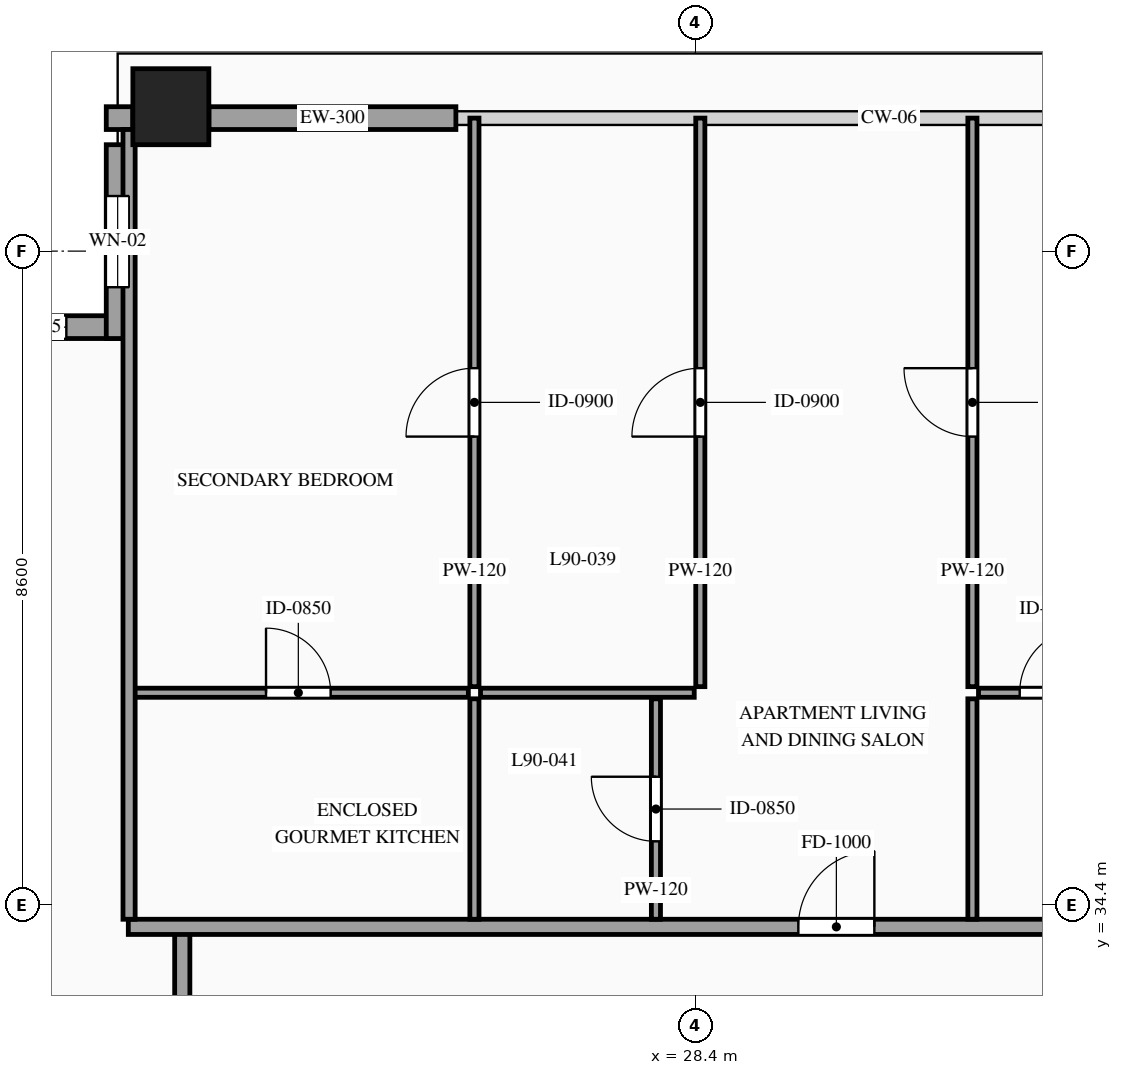
"""IFC4 building model, lengths in metres.
Left out: names, types, materials, properties, quantities, classifications, styles, units other than length and angle.
Written with IfcOpenShell. Run it as: python <this file> out.ifc"""

import sys

from ifc_helpers import new_model, si_unit, direction, frame, frame_2d, origin, origin_2d, place, context, subcontext, project, spatial, rectangle, hollow_rectangle, extrude, source, transform, mapped, element, fill, save


model = new_model("IFC4")
c1 = context("Model", 3, precision=1e-05, world=origin(), true_north=direction((0.0, 1.0)))
c2 = subcontext(c1, "Body", "Model", "MODEL_VIEW")
j1 = project(units=[si_unit("LENGTHUNIT", "METRE"), si_unit("PLANEANGLEUNIT", "RADIAN")], contexts=[c1])
p1 = place(None, origin())
s1 = spatial("IfcSite", under=j1, at=p1, CompositionType="ELEMENT")
p2 = place(p1, origin())
s2 = spatial("IfcBuilding", under=s1, at=p2, CompositionType="ELEMENT")
p3 = place(p2, frame((0.0, 0.0, 335.7)))
s3 = spatial("IfcBuildingStorey", under=s2, at=p3, CompositionType="ELEMENT", Elevation=335.7)
m1 = source(origin(), c2, "Body", "SweptSolid", [
    extrude(hollow_rectangle(XDim=1.0, YDim=1.0, WallThickness=0.048, at=origin_2d()), origin(), (0.0, 0.0, 1.0), 3.5),
])
p4 = place(p3, frame((21.5, 44.9, 0.0), z_axis=(0.0, 0.0, 1.0), x_axis=(1.0, 0.0, 0.0)))
e1 = element("IfcColumn", 1, at=p4, inside=s3, PredefinedType="COLUMN", context=c2, shape_type="MappedRepresentation", body=[
    mapped(m1, transform((0.0, 0.0, 0.0), scale=1.0)),
])
p5 = place(p3, frame((20.95, 42.0, 0.0), z_axis=(0.0, 0.0, 1.0), x_axis=(-1.0, 0.0, 0.0)))
e2 = element("IfcWall", 2, at=p5, inside=s3, PredefinedType="SOLIDWALL", context=c2, shape_type="SweptSolid", body=[
    extrude(rectangle(XDim=2.55, YDim=0.3, at=frame_2d((1.275, 0.0))), origin(), (0.0, 0.0, 1.0), 3.26),
])
p6 = place(p5, frame((0.825, 0.0, 0.85)))
e3 = element("IfcOpeningElement", 3, at=p6, cuts=e2, PredefinedType="OPENING", context=c2, shape_type="SweptSolid", body=[
    extrude(rectangle(XDim=0.9, YDim=1.5, at=frame_2d((0.45, 0.75))), frame((0.0, 0.165, 0.0), z_axis=(0.0, -1.0, 0.0), x_axis=(1.0, 0.0, 0.0)), (0.0, 0.0, 1.0), 0.33),
])
p7 = place(p3, frame((20.8, 44.4, 0.0), z_axis=(0.0, 0.0, 1.0), x_axis=(0.0, -1.0, 0.0)))
e4 = element("IfcWall", 4, at=p7, inside=s3, PredefinedType="SOLIDWALL", context=c2, shape_type="SweptSolid", body=[
    extrude(rectangle(XDim=2.55, YDim=0.3, at=frame_2d((1.275, 0.0))), origin(), (0.0, 0.0, 1.0), 3.26),
])
p8 = place(p7, frame((0.675, 0.0, 0.85)))
e5 = element("IfcOpeningElement", 5, at=p8, cuts=e4, PredefinedType="OPENING", context=c2, shape_type="SweptSolid", body=[
    extrude(rectangle(XDim=1.2, YDim=2.1, at=frame_2d((0.6, 1.05))), frame((0.0, 0.165, 0.0), z_axis=(0.0, -1.0, 0.0), x_axis=(1.0, 0.0, 0.0)), (0.0, 0.0, 1.0), 0.33),
])
m2 = source(origin(), c2, "Body", "SweptSolid", [
    extrude(rectangle(XDim=0.35, YDim=0.3, at=frame_2d((0.175, 0.0))), origin(), (0.0, 0.0, 1.0), 3.26),
])
p9 = place(p3, frame((20.65, 44.75, 0.0), z_axis=(0.0, 0.0, 1.0), x_axis=(1.0, 0.0, 0.0)))
e6 = element("IfcWall", 6, at=p9, inside=s3, PredefinedType="SOLIDWALL", context=c2, shape_type="MappedRepresentation", body=[
    mapped(m2, transform((0.0, 0.0, 0.0), scale=1.0)),
])
m3 = source(origin(), c2, "Body", "SweptSolid", [
    extrude(rectangle(XDim=3.25, YDim=0.3, at=frame_2d((1.625, 0.0))), origin(), (0.0, 0.0, 1.0), 2.865),
])
p10 = place(p3, frame((22.0, 44.75, 0.0), z_axis=(0.0, 0.0, 1.0), x_axis=(1.0, 0.0, 0.0)))
e7 = element("IfcWall", 7, at=p10, inside=s3, PredefinedType="SOLIDWALL", context=c2, shape_type="MappedRepresentation", body=[
    mapped(m3, transform((0.0, 0.0, 0.0), scale=1.0)),
])
m4 = source(origin(), c2, "Body", "SweptSolid", [
    extrude(rectangle(XDim=1.7, YDim=0.2, at=frame_2d((0.85, 0.0))), origin(), (0.0, 0.0, 1.0), 3.26),
])
p11 = place(p3, frame((21.65, 32.35, 0.0), z_axis=(0.0, 0.0, 1.0), x_axis=(0.0, 1.0, 0.0)))
e8 = element("IfcWall", 8, at=p11, inside=s3, PredefinedType="PARTITIONING", context=c2, shape_type="MappedRepresentation", body=[
    mapped(m4, transform((0.0, 0.0, 0.0), scale=1.0)),
])
p12 = place(p3, frame((20.94, 34.11, 0.0), z_axis=(0.0, 0.0, 1.0), x_axis=(1.0, 0.0, 0.0)))
e9 = element("IfcWall", 9, at=p12, inside=s3, PredefinedType="PARTITIONING", context=c2, shape_type="SweptSolid", body=[
    extrude(rectangle(XDim=15.98, YDim=0.2, at=frame_2d((7.99, 0.0))), origin(), (0.0, 0.0, 1.0), 3.26),
])
p13 = place(p12, frame((8.816, 0.0, 0.0)))
e10 = element("IfcOpeningElement", 10, at=p13, cuts=e9, PredefinedType="OPENING", context=c2, shape_type="SweptSolid", body=[
    extrude(rectangle(XDim=1.0, YDim=2.2, at=frame_2d((0.5, 1.1))), frame((0.0, 0.115, 0.0), z_axis=(0.0, -1.0, 0.0), x_axis=(1.0, 0.0, 0.0)), (0.0, 0.0, 1.0), 0.23),
])
p14 = place(p3, frame((20.94, 37.19, 0.0), z_axis=(0.0, 0.0, 1.0), x_axis=(1.0, 0.0, 0.0)))
e11 = element("IfcWall", 11, at=p14, inside=s3, PredefinedType="PARTITIONING", context=c2, shape_type="SweptSolid", body=[
    extrude(rectangle(XDim=4.474, YDim=0.12, at=frame_2d((2.237, 0.0))), origin(), (0.0, 0.0, 1.0), 3.26),
])
p15 = place(p14, frame((1.812, 0.0, 0.0)))
e12 = element("IfcOpeningElement", 12, at=p15, cuts=e11, PredefinedType="OPENING", context=c2, shape_type="SweptSolid", body=[
    extrude(rectangle(XDim=0.85, YDim=2.1, at=frame_2d((0.425, 1.05))), frame((0.0, 0.075, 0.0), z_axis=(0.0, -1.0, 0.0), x_axis=(1.0, 0.0, 0.0)), (0.0, 0.0, 1.0), 0.15),
])
m5 = source(origin(), c2, "Body", "SweptSolid", [
    extrude(rectangle(XDim=2.9, YDim=0.12, at=frame_2d((1.45, 0.0))), origin(), (0.0, 0.0, 1.0), 3.26),
])
p16 = place(p3, frame((25.494, 34.21, 0.0), z_axis=(0.0, 0.0, 1.0), x_axis=(0.0, 1.0, 0.0)))
e13 = element("IfcWall", 13, at=p16, inside=s3, PredefinedType="PARTITIONING", context=c2, shape_type="MappedRepresentation", body=[
    mapped(m5, transform((0.0, 0.0, 0.0), scale=1.0)),
])
p17 = place(p3, frame((27.882, 34.21, 0.0), z_axis=(0.0, 0.0, 1.0), x_axis=(0.0, 1.0, 0.0)))
e14 = element("IfcWall", 14, at=p17, inside=s3, PredefinedType="PARTITIONING", context=c2, shape_type="SweptSolid", body=[
    extrude(rectangle(XDim=2.9, YDim=0.12, at=frame_2d((1.45, 0.0))), origin(), (0.0, 0.0, 1.0), 3.26),
])
p18 = place(p17, frame((1.025, 0.0, 0.0)))
e15 = element("IfcOpeningElement", 15, at=p18, cuts=e14, PredefinedType="OPENING", context=c2, shape_type="SweptSolid", body=[
    extrude(rectangle(XDim=0.85, YDim=2.1, at=frame_2d((0.425, 1.05))), frame((0.0, 0.075, 0.0), z_axis=(0.0, -1.0, 0.0), x_axis=(1.0, 0.0, 0.0)), (0.0, 0.0, 1.0), 0.15),
])
p19 = place(p3, frame((32.046, 34.21, 0.0), z_axis=(0.0, 0.0, 1.0), x_axis=(0.0, 1.0, 0.0)))
e16 = element("IfcWall", 16, at=p19, inside=s3, PredefinedType="PARTITIONING", context=c2, shape_type="MappedRepresentation", body=[
    mapped(m5, transform((0.0, 0.0, 0.0), scale=1.0)),
])
p20 = place(p3, frame((25.494, 37.27, 0.0), z_axis=(0.0, 0.0, 1.0), x_axis=(0.0, 1.0, 0.0)))
e17 = element("IfcWall", 17, at=p20, inside=s3, PredefinedType="PARTITIONING", context=c2, shape_type="SweptSolid", body=[
    extrude(rectangle(XDim=7.48, YDim=0.12, at=frame_2d((3.74, 0.0))), origin(), (0.0, 0.0, 1.0), 3.26),
])
p21 = place(p20, frame((3.29, 0.0, 0.0)))
e18 = element("IfcOpeningElement", 18, at=p21, cuts=e17, PredefinedType="OPENING", context=c2, shape_type="SweptSolid", body=[
    extrude(rectangle(XDim=0.9, YDim=2.15, at=frame_2d((0.45, 1.075))), frame((0.0, 0.075, 0.0), z_axis=(0.0, -1.0, 0.0), x_axis=(1.0, 0.0, 0.0)), (0.0, 0.0, 1.0), 0.15),
])
p22 = place(p3, frame((32.126, 37.19, 0.0), z_axis=(0.0, 0.0, 1.0), x_axis=(1.0, 0.0, 0.0)))
e19 = element("IfcWall", 19, at=p22, inside=s3, PredefinedType="PARTITIONING", context=c2, shape_type="SweptSolid", body=[
    extrude(rectangle(XDim=4.794, YDim=0.12, at=frame_2d((2.397, 0.0))), origin(), (0.0, 0.0, 1.0), 3.26),
])
p23 = place(p22, frame((3.019, 0.0, 0.0)))
e20 = element("IfcOpeningElement", 20, at=p23, cuts=e19, PredefinedType="OPENING", context=c2, shape_type="SweptSolid", body=[
    extrude(rectangle(XDim=0.85, YDim=2.1, at=frame_2d((0.425, 1.05))), frame((0.0, 0.075, 0.0), z_axis=(0.0, -1.0, 0.0), x_axis=(1.0, 0.0, 0.0)), (0.0, 0.0, 1.0), 0.15),
])
p24 = place(p22, frame((0.542, 0.0, 0.0)))
e21 = element("IfcOpeningElement", 21, at=p24, cuts=e19, PredefinedType="OPENING", context=c2, shape_type="SweptSolid", body=[
    extrude(rectangle(XDim=0.85, YDim=2.1, at=frame_2d((0.425, 1.05))), frame((0.0, 0.075, 0.0), z_axis=(0.0, -1.0, 0.0), x_axis=(1.0, 0.0, 0.0)), (0.0, 0.0, 1.0), 0.15),
])
p25 = place(p3, frame((32.046, 37.27, 0.0), z_axis=(0.0, 0.0, 1.0), x_axis=(0.0, 1.0, 0.0)))
e22 = element("IfcWall", 22, at=p25, inside=s3, PredefinedType="PARTITIONING", context=c2, shape_type="SweptSolid", body=[
    extrude(rectangle(XDim=7.48, YDim=0.12, at=frame_2d((3.74, 0.0))), origin(), (0.0, 0.0, 1.0), 3.26),
])
p26 = place(p25, frame((3.29, 0.0, 0.0)))
e23 = element("IfcOpeningElement", 23, at=p26, cuts=e22, PredefinedType="OPENING", context=c2, shape_type="SweptSolid", body=[
    extrude(rectangle(XDim=0.9, YDim=2.15, at=frame_2d((0.45, 1.075))), frame((0.0, 0.075, 0.0), z_axis=(0.0, -1.0, 0.0), x_axis=(1.0, 0.0, 0.0)), (0.0, 0.0, 1.0), 0.15),
])
m6 = source(origin(), c2, "Body", "SweptSolid", [
    extrude(rectangle(XDim=2.812, YDim=0.12, at=frame_2d((1.406, 0.0))), origin(), (0.0, 0.0, 1.0), 3.26),
])
p27 = place(p3, frame((25.574, 37.19, 0.0), z_axis=(0.0, 0.0, 1.0), x_axis=(1.0, 0.0, 0.0)))
e24 = element("IfcWall", 24, at=p27, inside=s3, PredefinedType="PARTITIONING", context=c2, shape_type="MappedRepresentation", body=[
    mapped(m6, transform((0.0, 0.0, 0.0), scale=1.0)),
])
p28 = place(p3, frame((28.466, 37.27, 0.0), z_axis=(0.0, 0.0, 1.0), x_axis=(0.0, 1.0, 0.0)))
e25 = element("IfcWall", 25, at=p28, inside=s3, PredefinedType="PARTITIONING", context=c2, shape_type="SweptSolid", body=[
    extrude(rectangle(XDim=7.48, YDim=0.12, at=frame_2d((3.74, 0.0))), origin(), (0.0, 0.0, 1.0), 3.26),
])
p29 = place(p28, frame((3.29, 0.0, 0.0)))
e26 = element("IfcOpeningElement", 26, at=p29, cuts=e25, PredefinedType="OPENING", context=c2, shape_type="SweptSolid", body=[
    extrude(rectangle(XDim=0.9, YDim=2.15, at=frame_2d((0.45, 1.075))), frame((0.0, 0.075, 0.0), z_axis=(0.0, -1.0, 0.0), x_axis=(1.0, 0.0, 0.0)), (0.0, 0.0, 1.0), 0.15),
])
m7 = source(origin(), c2, "Body", "SweptSolid", [
    extrude(rectangle(XDim=10.39, YDim=0.16, at=frame_2d((5.195, 0.0))), origin(), (0.0, 0.0, 1.0), 3.26),
])
p30 = place(p3, frame((20.95, 34.21, 0.0), z_axis=(0.0, 0.0, 1.0), x_axis=(0.0, 1.0, 0.0)))
e27 = element("IfcWall", 27, at=p30, inside=s3, PredefinedType="PARTITIONING", context=c2, shape_type="MappedRepresentation", body=[
    mapped(m7, transform((0.0, 0.0, 0.0), scale=1.0)),
])
m8 = source(origin(), c2, "Body", "SweptSolid", [
    extrude(rectangle(XDim=0.9, YDim=1.5, at=frame_2d((0.45, 0.75))), frame((0.0, 0.03, 0.0), z_axis=(0.0, -1.0, 0.0), x_axis=(1.0, 0.0, 0.0)), (0.0, 0.0, 1.0), 0.06),
])
p31 = place(p6, origin())
e28 = element("IfcWindow", 28, at=p31, inside=s3, PartitioningType="SINGLE_PANEL", PredefinedType="WINDOW", context=c2, shape_type="MappedRepresentation", body=[
    mapped(m8, transform((0.0, 0.0, 0.0), scale=1.0)),
])
fill(e3, e28)
m9 = source(origin(), c2, "Body", "SweptSolid", [
    extrude(rectangle(XDim=1.2, YDim=2.1, at=frame_2d((0.6, 1.05))), frame((0.0, 0.03, 0.0), z_axis=(0.0, -1.0, 0.0), x_axis=(1.0, 0.0, 0.0)), (0.0, 0.0, 1.0), 0.06),
])
p32 = place(p8, origin())
e29 = element("IfcWindow", 29, at=p32, inside=s3, PartitioningType="SINGLE_PANEL", PredefinedType="WINDOW", context=c2, shape_type="MappedRepresentation", body=[
    mapped(m9, transform((0.0, 0.0, 0.0), scale=1.0)),
])
fill(e5, e29)
m10 = source(origin(), c2, "Body", "SweptSolid", [
    extrude(rectangle(XDim=1.0, YDim=2.2, at=frame_2d((0.5, 1.1))), frame((0.0, 0.025, 0.0), z_axis=(0.0, -1.0, 0.0), x_axis=(1.0, 0.0, 0.0)), (0.0, 0.0, 1.0), 0.05),
])
p33 = place(p13, origin())
e30 = element("IfcDoor", 30, at=p33, inside=s3, OperationType="SINGLE_SWING_RIGHT", PredefinedType="DOOR", context=c2, shape_type="MappedRepresentation", body=[
    mapped(m10, transform((0.0, 0.0, 0.0), scale=1.0)),
])
fill(e10, e30)
m11 = source(origin(), c2, "Body", "SweptSolid", [
    extrude(rectangle(XDim=0.85, YDim=2.1, at=frame_2d((0.425, 1.05))), frame((0.0, 0.025, 0.0), z_axis=(0.0, -1.0, 0.0), x_axis=(1.0, 0.0, 0.0)), (0.0, 0.0, 1.0), 0.05),
])
p34 = place(p15, origin())
e31 = element("IfcDoor", 31, at=p34, inside=s3, OperationType="SINGLE_SWING_LEFT", PredefinedType="DOOR", context=c2, shape_type="MappedRepresentation", body=[
    mapped(m11, transform((0.0, 0.0, 0.0), scale=1.0)),
])
fill(e12, e31)
p35 = place(p18, origin())
e32 = element("IfcDoor", 32, at=p35, inside=s3, OperationType="SINGLE_SWING_RIGHT", PredefinedType="DOOR", context=c2, shape_type="MappedRepresentation", body=[
    mapped(m11, transform((0.0, 0.0, 0.0), scale=1.0)),
])
fill(e15, e32)
p36 = place(p24, origin())
e33 = element("IfcDoor", 33, at=p36, inside=s3, OperationType="SINGLE_SWING_RIGHT", PredefinedType="DOOR", context=c2, shape_type="MappedRepresentation", body=[
    mapped(m11, transform((0.0, 0.0, 0.0), scale=1.0)),
])
fill(e21, e33)
m12 = source(origin(), c2, "Body", "SweptSolid", [
    extrude(rectangle(XDim=0.9, YDim=2.15, at=frame_2d((0.45, 1.075))), frame((0.0, 0.025, 0.0), z_axis=(0.0, -1.0, 0.0), x_axis=(1.0, 0.0, 0.0)), (0.0, 0.0, 1.0), 0.05),
])
p37 = place(p21, origin())
e34 = element("IfcDoor", 34, at=p37, inside=s3, OperationType="SINGLE_SWING_LEFT", PredefinedType="DOOR", context=c2, shape_type="MappedRepresentation", body=[
    mapped(m12, transform((0.0, 0.0, 0.0), scale=1.0)),
])
fill(e18, e34)
p38 = place(p26, origin())
e35 = element("IfcDoor", 35, at=p38, inside=s3, OperationType="SINGLE_SWING_RIGHT", PredefinedType="DOOR", context=c2, shape_type="MappedRepresentation", body=[
    mapped(m12, transform((0.0, 0.0, 0.0), scale=1.0)),
])
fill(e23, e35)
p39 = place(p29, origin())
e36 = element("IfcDoor", 36, at=p39, inside=s3, OperationType="SINGLE_SWING_LEFT", PredefinedType="DOOR", context=c2, shape_type="MappedRepresentation", body=[
    mapped(m12, transform((0.0, 0.0, 0.0), scale=1.0)),
])
fill(e26, e36)
save(model, sys.argv[1])
